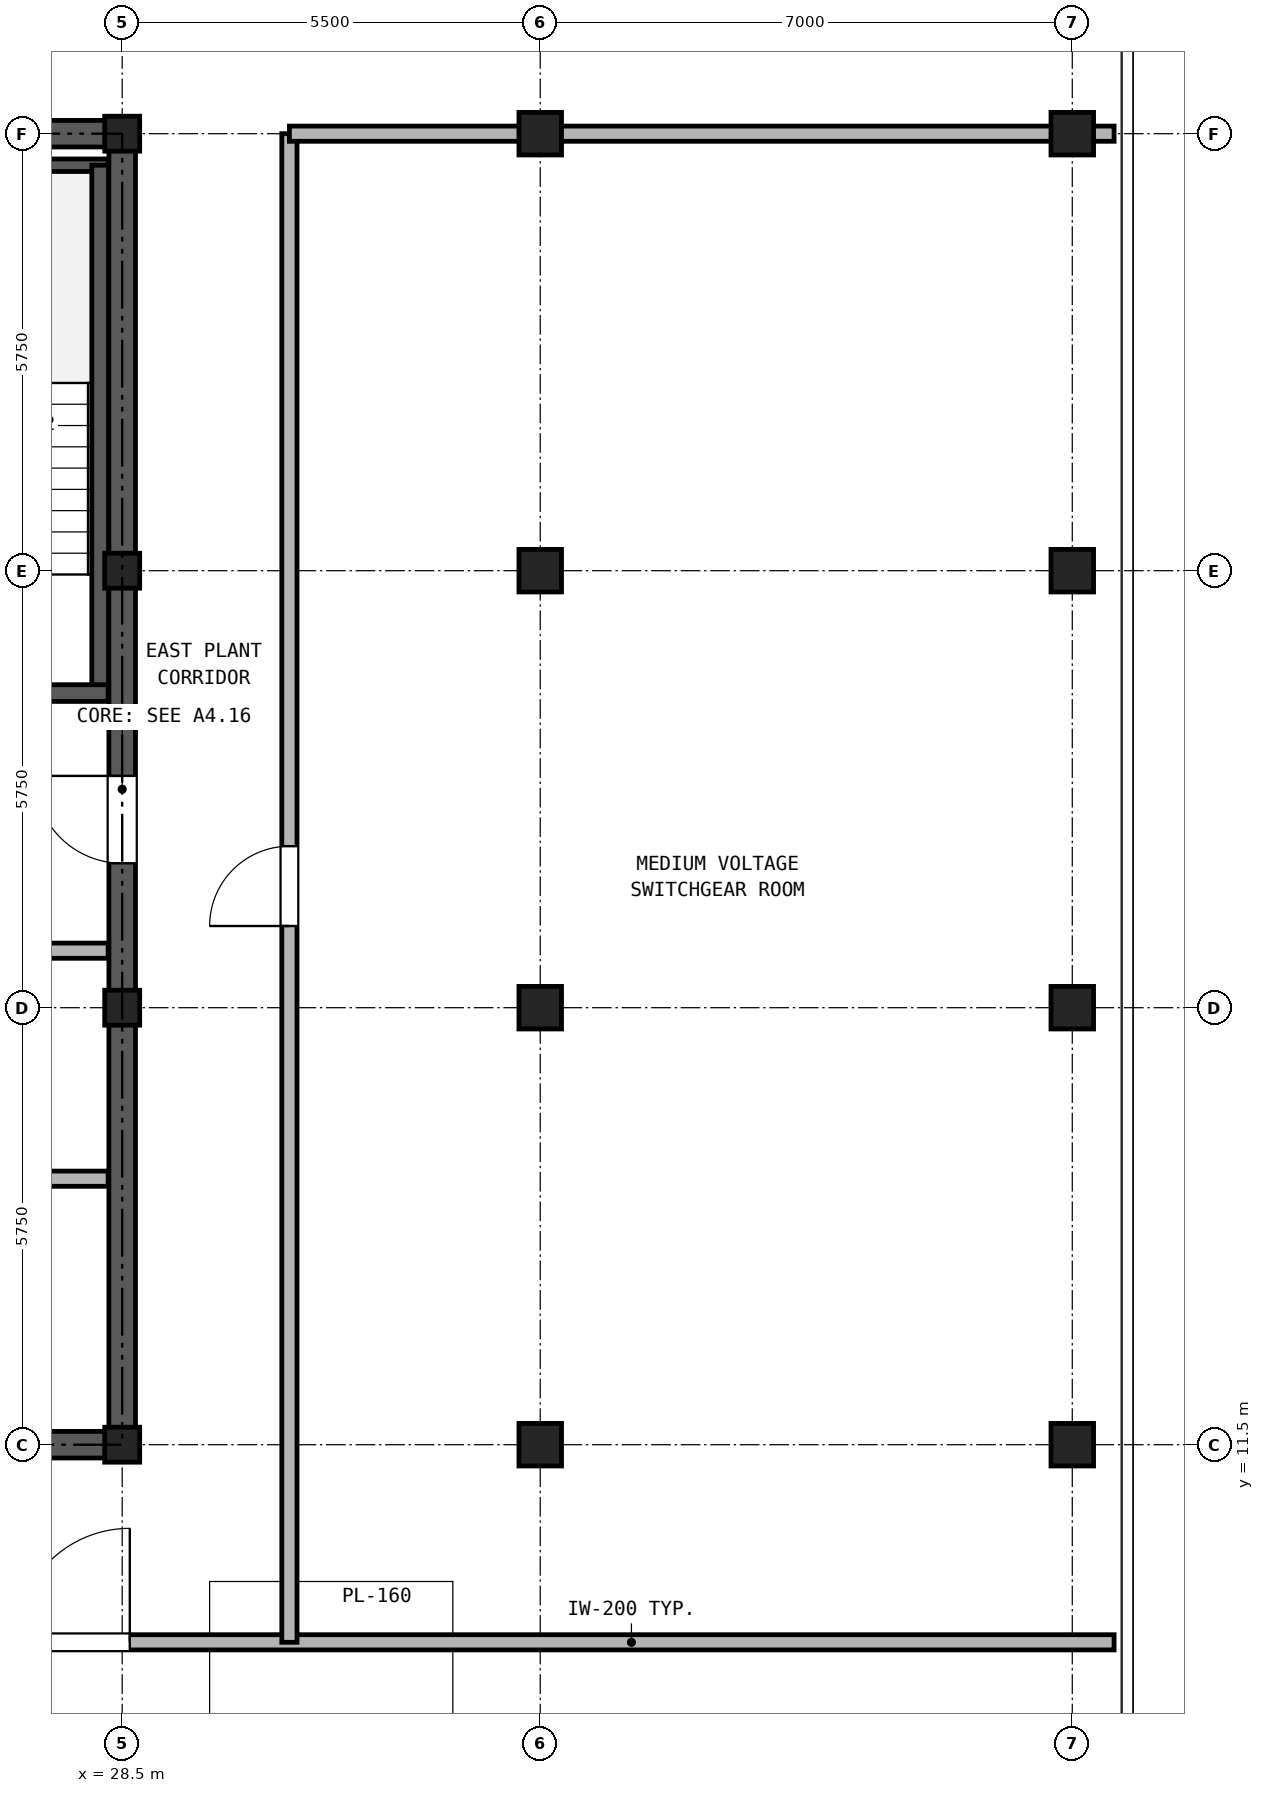
"""IFC4 building model, lengths in metres.
Left out: names, types, materials, properties, quantities, classifications, styles, units other than length and angle.
Written with IfcOpenShell. Run it as: python <this file> out.ifc"""

import sys

from ifc_helpers import new_model, si_unit, direction, frame, frame_2d, origin, origin_2d, place, context, subcontext, project, spatial, rectangle, hollow_rectangle, extrude, source, transform, mapped, element, fill, save


model = new_model("IFC4")
c1 = context("Model", 3, precision=1e-05, world=origin(), true_north=direction((0.0, 1.0)))
c2 = subcontext(c1, "Body", "Model", "MODEL_VIEW")
j1 = project(units=[si_unit("LENGTHUNIT", "METRE"), si_unit("PLANEANGLEUNIT", "RADIAN")], contexts=[c1])
p1 = place(None, origin())
s1 = spatial("IfcSite", under=j1, at=p1, CompositionType="ELEMENT")
p2 = place(p1, origin())
s2 = spatial("IfcBuilding", under=s1, at=p2, CompositionType="ELEMENT")
p3 = place(p2, frame((0.0, 0.0, 278.5)))
s3 = spatial("IfcBuildingStorey", under=s2, at=p3, CompositionType="ELEMENT", Elevation=278.5)
m1 = source(origin(), c2, "Body", "SweptSolid", [
    extrude(hollow_rectangle(XDim=0.56, YDim=0.56, WallThickness=0.03, at=origin_2d()), origin(), (0.0, 0.0, 1.0), 3.38),
])
for number, where, z_axis, x_axis in (
    (1, (41.0, 11.5, 0.0), (0.0, 0.0, 1.0), (1.0, 0.0, 0.0)),
    (2, (41.0, 17.25, 0.0), (0.0, 0.0, 1.0), (1.0, 0.0, 0.0)),
    (3, (41.0, 23.0, 0.0), (0.0, 0.0, 1.0), (1.0, 0.0, 0.0)),
    (4, (41.0, 28.75, 0.0), (0.0, 0.0, 1.0), (1.0, 0.0, 0.0)),
):
    element("IfcColumn", number, at=place(p3, frame(where, z_axis=z_axis, x_axis=x_axis)), inside=s3, PredefinedType="COLUMN", context=c2, shape_type="MappedRepresentation", body=[
        mapped(m1, transform((0.0, 0.0, 0.0), x_axis=(1.0, 0.0, 0.0), y_axis=(0.0, 1.0, 0.0), z_axis=(0.0, 0.0, 1.0), scale=1.0)),
    ])
m2 = source(origin(), c2, "Body", "SweptSolid", [
    extrude(hollow_rectangle(XDim=0.46, YDim=0.46, WallThickness=0.025, at=origin_2d()), origin(), (0.0, 0.0, 1.0), 3.38),
])
for number, where, z_axis, x_axis in (
    (5, (28.5, 11.5, 0.0), (0.0, 0.0, 1.0), (1.0, 0.0, 0.0)),
    (6, (28.5, 17.25, 0.0), (0.0, 0.0, 1.0), (1.0, 0.0, 0.0)),
    (7, (28.5, 23.0, 0.0), (0.0, 0.0, 1.0), (1.0, 0.0, 0.0)),
    (8, (28.5, 28.75, 0.0), (0.0, 0.0, 1.0), (1.0, 0.0, 0.0)),
):
    element("IfcColumn", number, at=place(p3, frame(where, z_axis=z_axis, x_axis=x_axis)), inside=s3, PredefinedType="COLUMN", context=c2, shape_type="MappedRepresentation", body=[
        mapped(m2, transform((0.0, 0.0, 0.0), x_axis=(1.0, 0.0, 0.0), y_axis=(0.0, 1.0, 0.0), z_axis=(0.0, 0.0, 1.0), scale=1.0)),
    ])
for number, where, z_axis, x_axis in (
    (9, (34.0, 11.5, 0.0), (0.0, 0.0, 1.0), (1.0, 0.0, 0.0)),
    (10, (34.0, 17.25, 0.0), (0.0, 0.0, 1.0), (1.0, 0.0, 0.0)),
    (11, (34.0, 23.0, 0.0), (0.0, 0.0, 1.0), (1.0, 0.0, 0.0)),
    (12, (34.0, 28.75, 0.0), (0.0, 0.0, 1.0), (1.0, 0.0, 0.0)),
):
    element("IfcColumn", number, at=place(p3, frame(where, z_axis=z_axis, x_axis=x_axis)), inside=s3, PredefinedType="COLUMN", context=c2, shape_type="MappedRepresentation", body=[
        mapped(m1, transform((0.0, 0.0, 0.0), x_axis=(1.0, 0.0, 0.0), y_axis=(0.0, 1.0, 0.0), z_axis=(0.0, 0.0, 1.0), scale=1.0)),
    ])
p4 = place(p3, frame((18.325, 11.5, 0.0), z_axis=(0.0, 0.0, 1.0), x_axis=(1.0, 0.0, 0.0)))
e13 = element("IfcWall", 13, at=p4, inside=s3, PredefinedType="SHEAR", context=c2, shape_type="SweptSolid", body=[
    extrude(rectangle(XDim=10.35, YDim=0.35, at=frame_2d((5.175, 0.0))), origin(), (0.0, 0.0, 1.0), 3.38),
])
p5 = place(p4, frame((4.375, 0.0, 0.0)))
e14 = element("IfcOpeningElement", 14, at=p5, cuts=e13, PredefinedType="OPENING", context=c2, shape_type="SweptSolid", body=[
    extrude(rectangle(XDim=1.5, YDim=2.25, at=frame_2d((0.75, 1.125))), frame((0.0, 0.185, 0.0), z_axis=(0.0, -1.0, 0.0), x_axis=(1.0, 0.0, 0.0)), (0.0, 0.0, 1.0), 0.37),
])
p6 = place(p3, frame((18.325, 28.75, 0.0), z_axis=(0.0, 0.0, 1.0), x_axis=(1.0, 0.0, 0.0)))
e15 = element("IfcWall", 15, at=p6, inside=s3, PredefinedType="SHEAR", context=c2, shape_type="SweptSolid", body=[
    extrude(rectangle(XDim=10.35, YDim=0.35, at=frame_2d((5.175, 0.0))), origin(), (0.0, 0.0, 1.0), 3.38),
])
p7 = place(p6, frame((4.055, 0.0, 0.0)))
e16 = element("IfcOpeningElement", 16, at=p7, cuts=e15, PredefinedType="OPENING", context=c2, shape_type="SweptSolid", body=[
    extrude(rectangle(XDim=0.9, YDim=2.05, at=frame_2d((0.45, 1.025))), frame((0.0, 0.185, 0.0), z_axis=(0.0, -1.0, 0.0), x_axis=(1.0, 0.0, 0.0)), (0.0, 0.0, 1.0), 0.37),
])
p8 = place(p6, frame((5.595, 0.0, 0.0)))
e17 = element("IfcOpeningElement", 17, at=p8, cuts=e15, PredefinedType="OPENING", context=c2, shape_type="SweptSolid", body=[
    extrude(rectangle(XDim=0.9, YDim=2.05, at=frame_2d((0.45, 1.025))), frame((0.0, 0.185, 0.0), z_axis=(0.0, -1.0, 0.0), x_axis=(1.0, 0.0, 0.0)), (0.0, 0.0, 1.0), 0.37),
])
p9 = place(p3, frame((28.5, 11.675, 0.0), z_axis=(0.0, 0.0, 1.0), x_axis=(0.0, 1.0, 0.0)))
e18 = element("IfcWall", 18, at=p9, inside=s3, PredefinedType="SHEAR", context=c2, shape_type="SweptSolid", body=[
    extrude(rectangle(XDim=16.9, YDim=0.35, at=frame_2d((8.45, 0.0))), origin(), (0.0, 0.0, 1.0), 3.38),
])
p10 = place(p9, frame((7.475, 0.0, 0.0)))
e19 = element("IfcOpeningElement", 19, at=p10, cuts=e18, PredefinedType="OPENING", context=c2, shape_type="SweptSolid", body=[
    extrude(rectangle(XDim=1.15, YDim=2.2, at=frame_2d((0.575, 1.1))), frame((0.0, 0.185, 0.0), z_axis=(0.0, -1.0, 0.0), x_axis=(1.0, 0.0, 0.0)), (0.0, 0.0, 1.0), 0.37),
])
p11 = place(p3, frame((25.13, 28.335, 0.0), z_axis=(0.0, 0.0, 1.0), x_axis=(1.0, 0.0, 0.0)))
e20 = element("IfcWall", 20, at=p11, inside=s3, PredefinedType="PARTITIONING", context=c2, shape_type="SweptSolid", body=[
    extrude(rectangle(XDim=3.185, YDim=0.165, at=frame_2d((1.593, 0.0))), origin(), (0.0, 0.0, 1.0), 3.38),
])
p12 = place(p3, frame((28.21, 21.39, 0.0), z_axis=(0.0, 0.0, 1.0), x_axis=(0.0, 1.0, 0.0)))
e21 = element("IfcWall", 21, at=p12, inside=s3, PredefinedType="SOLIDWALL", context=c2, shape_type="SweptSolid", body=[
    extrude(rectangle(XDim=6.945, YDim=0.22, at=frame_2d((3.473, 0.0))), origin(), (0.0, 0.0, 1.0), 3.38),
])
p13 = place(p3, frame((25.13, 21.39, 0.0), z_axis=(0.0, 0.0, 1.0), x_axis=(1.0, 0.0, 0.0)))
e22 = element("IfcWall", 22, at=p13, inside=s3, PredefinedType="SOLIDWALL", context=c2, shape_type="SweptSolid", body=[
    extrude(rectangle(XDim=3.185, YDim=0.22, at=frame_2d((1.593, 0.0))), origin(), (0.0, 0.0, 1.0), 3.38),
])
p14 = place(p13, frame((0.92, 0.0, 0.0)))
e23 = element("IfcOpeningElement", 23, at=p14, cuts=e22, PredefinedType="OPENING", context=c2, shape_type="SweptSolid", body=[
    extrude(rectangle(XDim=1.15, YDim=2.2, at=frame_2d((0.575, 1.1))), frame((0.0, 0.12, 0.0), z_axis=(0.0, -1.0, 0.0), x_axis=(1.0, 0.0, 0.0)), (0.0, 0.0, 1.0), 0.24),
])
p15 = place(p3, frame((18.685, 18.0, 0.0), z_axis=(0.0, 0.0, 1.0), x_axis=(1.0, 0.0, 0.0)))
e24 = element("IfcWall", 24, at=p15, inside=s3, PredefinedType="PARTITIONING", context=c2, shape_type="SweptSolid", body=[
    extrude(rectangle(XDim=9.63, YDim=0.2, at=frame_2d((4.815, 0.0))), origin(), (0.0, 0.0, 1.0), 3.38),
])
p16 = place(p15, frame((0.565, 0.0, 0.0)))
e25 = element("IfcOpeningElement", 25, at=p16, cuts=e24, PredefinedType="OPENING", context=c2, shape_type="SweptSolid", body=[
    extrude(rectangle(XDim=1.3, YDim=2.3, at=frame_2d((0.65, 1.15))), frame((0.0, 0.11, 0.0), z_axis=(0.0, -1.0, 0.0), x_axis=(1.0, 0.0, 0.0)), (0.0, 0.0, 1.0), 0.22),
])
p17 = place(p15, frame((2.665, 0.0, 0.0)))
e26 = element("IfcOpeningElement", 26, at=p17, cuts=e24, PredefinedType="OPENING", context=c2, shape_type="SweptSolid", body=[
    extrude(rectangle(XDim=1.3, YDim=2.3, at=frame_2d((0.65, 1.15))), frame((0.0, 0.11, 0.0), z_axis=(0.0, -1.0, 0.0), x_axis=(1.0, 0.0, 0.0)), (0.0, 0.0, 1.0), 0.22),
])
p18 = place(p15, frame((7.165, 0.0, 0.0)))
e27 = element("IfcOpeningElement", 27, at=p18, cuts=e24, PredefinedType="OPENING", context=c2, shape_type="SweptSolid", body=[
    extrude(rectangle(XDim=1.0, YDim=2.15, at=frame_2d((0.5, 1.075))), frame((0.0, 0.11, 0.0), z_axis=(0.0, -1.0, 0.0), x_axis=(1.0, 0.0, 0.0)), (0.0, 0.0, 1.0), 0.22),
])
p19 = place(p3, frame((18.685, 15.0, 0.0), z_axis=(0.0, 0.0, 1.0), x_axis=(1.0, 0.0, 0.0)))
e28 = element("IfcWall", 28, at=p19, inside=s3, PredefinedType="PARTITIONING", context=c2, shape_type="SweptSolid", body=[
    extrude(rectangle(XDim=9.63, YDim=0.2, at=frame_2d((4.815, 0.0))), origin(), (0.0, 0.0, 1.0), 3.38),
])
p20 = place(p3, frame((12.45, 8.9, 0.0), z_axis=(0.0, 0.0, 1.0), x_axis=(1.0, 0.0, 0.0)))
e29 = element("IfcWall", 29, at=p20, inside=s3, PredefinedType="PARTITIONING", context=c2, shape_type="SweptSolid", body=[
    extrude(rectangle(XDim=29.1, YDim=0.2, at=frame_2d((14.55, 0.0))), origin(), (0.0, 0.0, 1.0), 3.38),
])
p21 = place(p20, frame((7.45, 0.0, 0.0)))
e30 = element("IfcOpeningElement", 30, at=p21, cuts=e29, PredefinedType="OPENING", context=c2, shape_type="SweptSolid", body=[
    extrude(rectangle(XDim=1.5, YDim=2.25, at=frame_2d((0.75, 1.125))), frame((0.0, 0.11, 0.0), z_axis=(0.0, -1.0, 0.0), x_axis=(1.0, 0.0, 0.0)), (0.0, 0.0, 1.0), 0.22),
])
p22 = place(p20, frame((14.65, 0.0, 0.0)))
e31 = element("IfcOpeningElement", 31, at=p22, cuts=e29, PredefinedType="OPENING", context=c2, shape_type="SweptSolid", body=[
    extrude(rectangle(XDim=1.5, YDim=2.25, at=frame_2d((0.75, 1.125))), frame((0.0, 0.11, 0.0), z_axis=(0.0, -1.0, 0.0), x_axis=(1.0, 0.0, 0.0)), (0.0, 0.0, 1.0), 0.22),
])
p23 = place(p3, frame((30.7, 8.9, 0.0), z_axis=(0.0, 0.0, 1.0), x_axis=(0.0, 1.0, 0.0)))
e32 = element("IfcWall", 32, at=p23, inside=s3, PredefinedType="PARTITIONING", context=c2, shape_type="SweptSolid", body=[
    extrude(rectangle(XDim=19.85, YDim=0.2, at=frame_2d((9.925, 0.0))), origin(), (0.0, 0.0, 1.0), 3.38),
])
p24 = place(p23, frame((9.425, 0.0, 0.0)))
e33 = element("IfcOpeningElement", 33, at=p24, cuts=e32, PredefinedType="OPENING", context=c2, shape_type="SweptSolid", body=[
    extrude(rectangle(XDim=1.05, YDim=2.15, at=frame_2d((0.525, 1.075))), frame((0.0, 0.11, 0.0), z_axis=(0.0, -1.0, 0.0), x_axis=(1.0, 0.0, 0.0)), (0.0, 0.0, 1.0), 0.22),
])
p25 = place(p3, frame((30.7, 28.75, 0.0), z_axis=(0.0, 0.0, 1.0), x_axis=(1.0, 0.0, 0.0)))
e34 = element("IfcWall", 34, at=p25, inside=s3, PredefinedType="PARTITIONING", context=c2, shape_type="SweptSolid", body=[
    extrude(rectangle(XDim=10.85, YDim=0.2, at=frame_2d((5.425, 0.0))), origin(), (0.0, 0.0, 1.0), 2.905),
])
p26 = place(p10, origin())
e35 = element("IfcDoor", 35, at=p26, inside=s3, OperationType="SINGLE_SWING_RIGHT", PredefinedType="DOOR", context=c2, shape_type="SweptSolid", body=[
    extrude(rectangle(XDim=1.15, YDim=2.2, at=frame_2d((0.575, 1.1))), frame((0.0, 0.025, 0.0), z_axis=(0.0, -1.0, 0.0), x_axis=(1.0, 0.0, 0.0)), (0.0, 0.0, 1.0), 0.05),
])
fill(e19, e35)
p27 = place(p22, frame((1.5, 0.0, 0.0), z_axis=(0.0, 0.0, 1.0), x_axis=(-1.0, 0.0, 0.0)))
e36 = element("IfcDoor", 36, at=p27, inside=s3, OperationType="SINGLE_SWING_RIGHT", PredefinedType="DOOR", context=c2, shape_type="SweptSolid", body=[
    extrude(rectangle(XDim=1.5, YDim=2.25, at=frame_2d((0.75, 1.125))), frame((0.0, 0.025, 0.0), z_axis=(0.0, -1.0, 0.0), x_axis=(1.0, 0.0, 0.0)), (0.0, 0.0, 1.0), 0.05),
])
fill(e31, e36)
p28 = place(p24, origin())
e37 = element("IfcDoor", 37, at=p28, inside=s3, OperationType="SINGLE_SWING_LEFT", PredefinedType="DOOR", context=c2, shape_type="SweptSolid", body=[
    extrude(rectangle(XDim=1.05, YDim=2.15, at=frame_2d((0.525, 1.075))), frame((0.0, 0.025, 0.0), z_axis=(0.0, -1.0, 0.0), x_axis=(1.0, 0.0, 0.0)), (0.0, 0.0, 1.0), 0.05),
])
fill(e33, e37)
save(model, sys.argv[1])
